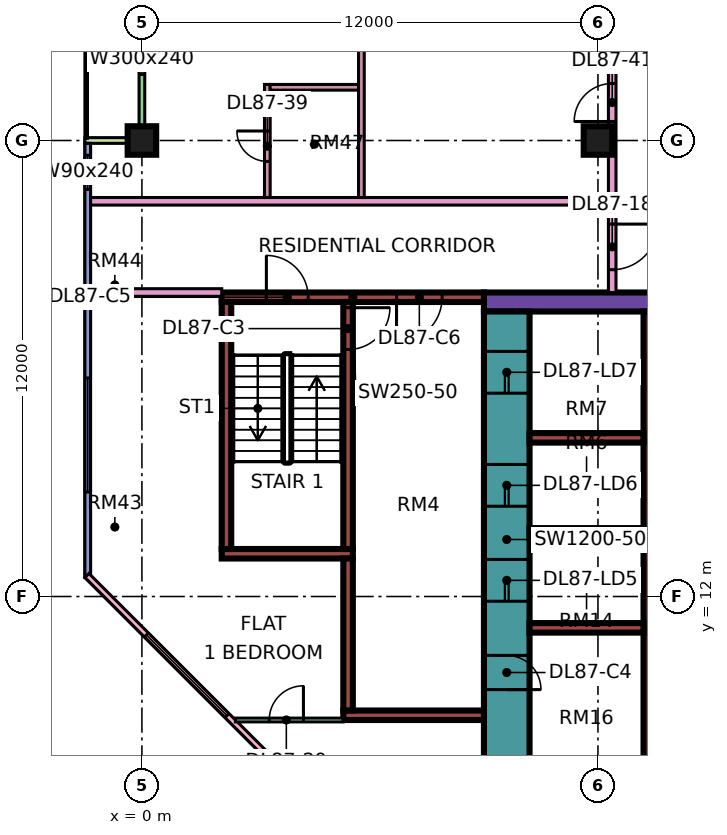
"""IFC4 building model, lengths in metres.
Left out: names, types, materials, properties, quantities, classifications, styles, units other than length and angle.
Written with IfcOpenShell. Run it as: python <this file> out.ifc"""

import sys

from ifc_helpers import new_model, si_unit, direction, frame, frame_2d, origin, origin_2d, place, context, subcontext, project, spatial, rectangle, extrude, element, fill, save


model = new_model("IFC4")
c1 = context("Model", 3, precision=1e-05, world=origin(), true_north=direction((0.0, 1.0)))
c2 = subcontext(c1, "Body", "Model", "MODEL_VIEW")
j1 = project(units=[si_unit("LENGTHUNIT", "METRE"), si_unit("PLANEANGLEUNIT", "RADIAN")], contexts=[c1])
p1 = place(None, origin())
s1 = spatial("IfcSite", under=j1, at=p1, CompositionType="ELEMENT")
p2 = place(p1, origin())
s2 = spatial("IfcBuilding", under=s1, at=p2, CompositionType="ELEMENT")
p3 = place(p2, frame((0.0, 0.0, 372.65)))
s3 = spatial("IfcBuildingStorey", under=s2, at=p3, CompositionType="ELEMENT", Elevation=372.65)
for number, where, z_axis, x_axis in (
    (1, (0.0, 24.0, 0.0), (0.0, 0.0, 1.0), (1.0, 0.0, 0.0)),
    (2, (12.0, 24.0, 0.0), (0.0, 0.0, 1.0), (1.0, 0.0, 0.0)),
):
    element("IfcColumn", number, at=place(p3, frame(where, z_axis=z_axis, x_axis=x_axis)), inside=s3, PredefinedType="COLUMN", context=c2, shape_type="SweptSolid", body=[
        extrude(rectangle(XDim=0.75, YDim=0.75, at=origin_2d()), origin(), (0.0, 0.0, 1.0), 3.75),
    ])
p4 = place(p3, frame((9.0, 19.75, 0.0), z_axis=(0.0, 0.0, 1.0), x_axis=(1.0, 0.0, 0.0)))
e3 = element("IfcWall", 3, at=p4, inside=s3, PredefinedType="SHEAR", context=c2, shape_type="SweptSolid", body=[
    extrude(rectangle(XDim=25.0, YDim=0.5, at=frame_2d((12.5, 0.0))), origin(), (0.0, 0.0, 1.0), 3.75),
])
p5 = place(p4, frame((19.1, 0.0, 0.0)))
e4 = element("IfcOpeningElement", 4, at=p5, cuts=e3, PredefinedType="OPENING", context=c2, shape_type="SweptSolid", body=[
    extrude(rectangle(XDim=1.8, YDim=2.4, at=frame_2d((0.9, 1.2))), frame((0.0, 0.26, 0.0), z_axis=(0.0, -1.0, 0.0), x_axis=(1.0, 0.0, 0.0)), (0.0, 0.0, 1.0), 0.52),
])
p6 = place(p3, frame((9.6, 7.5, 0.0), z_axis=(0.0, 0.0, 1.0), x_axis=(0.0, 1.0, 0.0)))
e5 = element("IfcWall", 5, at=p6, inside=s3, PredefinedType="SHEAR", context=c2, shape_type="SweptSolid", body=[
    extrude(rectangle(XDim=12.0, YDim=1.2, at=frame_2d((6.0, 0.0))), origin(), (0.0, 0.0, 1.0), 3.75),
])
p7 = place(p6, frame((4.375, 0.0, 0.0)))
e6 = element("IfcOpeningElement", 6, at=p7, cuts=e5, PredefinedType="OPENING", context=c2, shape_type="SweptSolid", body=[
    extrude(rectangle(XDim=1.1, YDim=2.2, at=frame_2d((0.55, 1.1))), frame((0.0, 0.61, 0.0), z_axis=(0.0, -1.0, 0.0), x_axis=(1.0, 0.0, 0.0)), (0.0, 0.0, 1.0), 1.22),
])
p8 = place(p6, frame((6.875, 0.0, 0.0)))
e7 = element("IfcOpeningElement", 7, at=p8, cuts=e5, PredefinedType="OPENING", context=c2, shape_type="SweptSolid", body=[
    extrude(rectangle(XDim=1.1, YDim=2.2, at=frame_2d((0.55, 1.1))), frame((0.0, 0.61, 0.0), z_axis=(0.0, -1.0, 0.0), x_axis=(1.0, 0.0, 0.0)), (0.0, 0.0, 1.0), 1.22),
])
p9 = place(p6, frame((9.85, 0.0, 0.0)))
e8 = element("IfcOpeningElement", 8, at=p9, cuts=e5, PredefinedType="OPENING", context=c2, shape_type="SweptSolid", body=[
    extrude(rectangle(XDim=1.1, YDim=2.2, at=frame_2d((0.55, 1.1))), frame((0.0, 0.61, 0.0), z_axis=(0.0, -1.0, 0.0), x_axis=(1.0, 0.0, 0.0)), (0.0, 0.0, 1.0), 1.22),
])
p10 = place(p6, frame((2.05, 0.0, 0.0)))
e9 = element("IfcOpeningElement", 9, at=p10, cuts=e5, PredefinedType="OPENING", context=c2, shape_type="SweptSolid", body=[
    extrude(rectangle(XDim=0.9, YDim=2.1, at=frame_2d((0.45, 1.05))), frame((0.0, 0.61, 0.0), z_axis=(0.0, -1.0, 0.0), x_axis=(1.0, 0.0, 0.0)), (0.0, 0.0, 1.0), 1.22),
])
p11 = place(p3, frame((13.325, 7.5, 0.0), z_axis=(0.0, 0.0, 1.0), x_axis=(0.0, 1.0, 0.0)))
e10 = element("IfcWall", 10, at=p11, inside=s3, PredefinedType="SHEAR", context=c2, shape_type="SweptSolid", body=[
    extrude(rectangle(XDim=12.0, YDim=0.25, at=frame_2d((6.0, 0.0))), origin(), (0.0, 0.0, 1.0), 3.75),
])
for number, where, z_axis, x_axis in (
    (11, (10.2, 11.175, 0.0), (0.0, 0.0, 1.0), (1.0, 0.0, 0.0)),
    (12, (10.2, 13.675, 0.0), (0.0, 0.0, 1.0), (1.0, 0.0, 0.0)),
    (13, (10.2, 16.175, 0.0), (0.0, 0.0, 1.0), (1.0, 0.0, 0.0)),
):
    element("IfcWall", number, at=place(p3, frame(where, z_axis=z_axis, x_axis=x_axis)), inside=s3, PredefinedType="SHEAR", context=c2, shape_type="SweptSolid", body=[
        extrude(rectangle(XDim=3.0, YDim=0.25, at=frame_2d((1.5, 0.0))), origin(), (0.0, 0.0, 1.0), 3.75),
    ])
p12 = place(p3, frame((2.1, 19.875, 0.0), z_axis=(0.0, 0.0, 1.0), x_axis=(1.0, 0.0, 0.0)))
e14 = element("IfcWall", 14, at=p12, inside=s3, PredefinedType="SHEAR", context=c2, shape_type="SweptSolid", body=[
    extrude(rectangle(XDim=6.9, YDim=0.25, at=frame_2d((3.45, 0.0))), origin(), (0.0, 0.0, 1.0), 3.75),
])
p13 = place(p12, frame((1.175, 0.0, 0.0)))
e15 = element("IfcOpeningElement", 15, at=p13, cuts=e14, PredefinedType="OPENING", context=c2, shape_type="SweptSolid", body=[
    extrude(rectangle(XDim=1.1, YDim=2.2, at=frame_2d((0.55, 1.1))), frame((0.0, 0.135, 0.0), z_axis=(0.0, -1.0, 0.0), x_axis=(1.0, 0.0, 0.0)), (0.0, 0.0, 1.0), 0.27),
])
p14 = place(p12, frame((4.6, 0.0, 0.0)))
e16 = element("IfcOpeningElement", 16, at=p14, cuts=e14, PredefinedType="OPENING", context=c2, shape_type="SweptSolid", body=[
    extrude(rectangle(XDim=1.2, YDim=2.2, at=frame_2d((0.6, 1.1))), frame((0.0, 0.135, 0.0), z_axis=(0.0, -1.0, 0.0), x_axis=(1.0, 0.0, 0.0)), (0.0, 0.0, 1.0), 0.27),
])
p15 = place(p3, frame((2.1, 13.125, 0.0), z_axis=(0.0, 0.0, 1.0), x_axis=(1.0, 0.0, 0.0)))
e17 = element("IfcWall", 17, at=p15, inside=s3, PredefinedType="SHEAR", context=c2, shape_type="SweptSolid", body=[
    extrude(rectangle(XDim=3.45, YDim=0.25, at=frame_2d((1.725, 0.0))), origin(), (0.0, 0.0, 1.0), 3.75),
])
p16 = place(p3, frame((2.225, 13.25, 0.0), z_axis=(0.0, 0.0, 1.0), x_axis=(0.0, 1.0, 0.0)))
e18 = element("IfcWall", 18, at=p16, inside=s3, PredefinedType="SHEAR", context=c2, shape_type="SweptSolid", body=[
    extrude(rectangle(XDim=6.5, YDim=0.25, at=frame_2d((3.25, 0.0))), origin(), (0.0, 0.0, 1.0), 3.75),
])
p17 = place(p3, frame((5.425, 13.25, 0.0), z_axis=(0.0, 0.0, 1.0), x_axis=(0.0, 1.0, 0.0)))
e19 = element("IfcWall", 19, at=p17, inside=s3, PredefinedType="SHEAR", context=c2, shape_type="SweptSolid", body=[
    extrude(rectangle(XDim=6.5, YDim=0.25, at=frame_2d((3.25, 0.0))), origin(), (0.0, 0.0, 1.0), 3.75),
])
p18 = place(p17, frame((5.25, 0.0, 0.0)))
e20 = element("IfcOpeningElement", 20, at=p18, cuts=e19, PredefinedType="OPENING", context=c2, shape_type="SweptSolid", body=[
    extrude(rectangle(XDim=1.1, YDim=2.2, at=frame_2d((0.55, 1.1))), frame((0.0, 0.135, 0.0), z_axis=(0.0, -1.0, 0.0), x_axis=(1.0, 0.0, 0.0)), (0.0, 0.0, 1.0), 0.27),
])
p19 = place(p3, frame((5.3, 8.875, 0.0), z_axis=(0.0, 0.0, 1.0), x_axis=(1.0, 0.0, 0.0)))
e21 = element("IfcWall", 21, at=p19, inside=s3, PredefinedType="SHEAR", context=c2, shape_type="SweptSolid", body=[
    extrude(rectangle(XDim=3.7, YDim=0.25, at=frame_2d((1.85, 0.0))), origin(), (0.0, 0.0, 1.0), 3.75),
])
p20 = place(p3, frame((5.425, 9.0, 0.0), z_axis=(0.0, 0.0, 1.0), x_axis=(0.0, 1.0, 0.0)))
e22 = element("IfcWall", 22, at=p20, inside=s3, PredefinedType="SHEAR", context=c2, shape_type="SweptSolid", body=[
    extrude(rectangle(XDim=4.0, YDim=0.25, at=frame_2d((2.0, 0.0))), origin(), (0.0, 0.0, 1.0), 3.75),
])
p21 = place(p3, frame((0.0, 35.925, 0.0), z_axis=(0.0, 0.0, 1.0), x_axis=(0.0, -1.0, 0.0)))
e23 = element("IfcWall", 23, at=p21, inside=s3, PredefinedType="SOLIDWALL", context=c2, shape_type="SweptSolid", body=[
    extrude(rectangle(XDim=11.85, YDim=0.15, at=frame_2d((5.925, 0.0))), origin(), (0.0, 0.0, 1.0), 3.35),
])
p22 = place(p21, frame((2.262, 0.0, 0.0)))
e24 = element("IfcOpeningElement", 24, at=p22, cuts=e23, PredefinedType="OPENING", context=c2, shape_type="SweptSolid", body=[
    extrude(rectangle(XDim=1.8, YDim=2.4, at=frame_2d((0.9, 1.2))), frame((0.0, 0.085, 0.0), z_axis=(0.0, -1.0, 0.0), x_axis=(1.0, 0.0, 0.0)), (0.0, 0.0, 1.0), 0.17),
])
p23 = place(p21, frame((7.188, 0.0, 0.45)))
e25 = element("IfcOpeningElement", 25, at=p23, cuts=e23, PredefinedType="OPENING", context=c2, shape_type="SweptSolid", body=[
    extrude(rectangle(XDim=3.0, YDim=2.4, at=frame_2d((1.5, 1.2))), frame((0.0, 0.085, 0.0), z_axis=(0.0, -1.0, 0.0), x_axis=(1.0, 0.0, 0.0)), (0.0, 0.0, 1.0), 0.17),
])
p24 = place(p3, frame((-1.5, 24.0, 0.0), z_axis=(0.0, 0.0, 1.0), x_axis=(1.0, 0.0, 0.0)))
e26 = element("IfcWall", 26, at=p24, inside=s3, PredefinedType="SOLIDWALL", context=c2, shape_type="SweptSolid", body=[
    extrude(rectangle(XDim=1.5, YDim=0.15, at=frame_2d((0.75, 0.0))), origin(), (0.0, 0.0, 1.0), 3.35),
])
p25 = place(p3, frame((-1.425, 23.925, 0.0), z_axis=(0.0, 0.0, 1.0), x_axis=(0.0, -1.0, 0.0)))
e27 = element("IfcWall", 27, at=p25, inside=s3, PredefinedType="SOLIDWALL", context=c2, shape_type="SweptSolid", body=[
    extrude(rectangle(XDim=11.425, YDim=0.15, at=frame_2d((5.712, 0.0))), origin(), (0.0, 0.0, 1.0), 3.35),
])
p26 = place(p25, frame((0.312, 0.0, 0.45)))
e28 = element("IfcOpeningElement", 28, at=p26, cuts=e27, PredefinedType="OPENING", context=c2, shape_type="SweptSolid", body=[
    extrude(rectangle(XDim=0.9, YDim=2.4, at=frame_2d((0.45, 1.2))), frame((0.0, 0.085, 0.0), z_axis=(0.0, -1.0, 0.0), x_axis=(1.0, 0.0, 0.0)), (0.0, 0.0, 1.0), 0.17),
])
p27 = place(p25, frame((6.175, 0.0, 0.45)))
e29 = element("IfcOpeningElement", 29, at=p27, cuts=e27, PredefinedType="OPENING", context=c2, shape_type="SweptSolid", body=[
    extrude(rectangle(XDim=3.0, YDim=2.4, at=frame_2d((1.5, 1.2))), frame((0.0, 0.085, 0.0), z_axis=(0.0, -1.0, 0.0), x_axis=(1.0, 0.0, 0.0)), (0.0, 0.0, 1.0), 0.17),
])
p28 = place(p3, frame((-1.447, 12.553, 0.0), z_axis=(0.0, 0.0, 1.0), x_axis=(0.707106781187, -0.707106781187, 0.0)))
e30 = element("IfcWall", 30, at=p28, inside=s3, PredefinedType="SOLIDWALL", context=c2, shape_type="SweptSolid", body=[
    extrude(rectangle(XDim=19.799, YDim=0.15, at=frame_2d((9.899, 0.0))), origin(), (0.0, 0.0, 1.0), 3.35),
])
p29 = place(p28, frame((2.212, 0.0, 0.45)))
e31 = element("IfcOpeningElement", 31, at=p29, cuts=e30, PredefinedType="OPENING", context=c2, shape_type="SweptSolid", body=[
    extrude(rectangle(XDim=3.0, YDim=2.4, at=frame_2d((1.5, 1.2))), frame((0.0, 0.085, 0.0), z_axis=(0.0, -1.0, 0.0), x_axis=(1.0, 0.0, 0.0)), (0.0, 0.0, 1.0), 0.17),
])
p30 = place(p28, frame((10.216, 0.0, 0.45)))
e32 = element("IfcOpeningElement", 32, at=p30, cuts=e30, PredefinedType="OPENING", context=c2, shape_type="SweptSolid", body=[
    extrude(rectangle(XDim=3.0, YDim=2.4, at=frame_2d((1.5, 1.2))), frame((0.0, 0.085, 0.0), z_axis=(0.0, -1.0, 0.0), x_axis=(1.0, 0.0, 0.0)), (0.0, 0.0, 1.0), 0.17),
])
p31 = place(p3, frame((-1.35, 20.0, 0.0), z_axis=(0.0, 0.0, 1.0), x_axis=(1.0, 0.0, 0.0)))
e33 = element("IfcWall", 33, at=p31, inside=s3, PredefinedType="PARTITIONING", context=c2, shape_type="SweptSolid", body=[
    extrude(rectangle(XDim=3.45, YDim=0.2, at=frame_2d((1.725, 0.0))), origin(), (0.0, 0.0, 1.0), 3.35),
])
p32 = place(p3, frame((-1.35, 22.4, 0.0), z_axis=(0.0, 0.0, 1.0), x_axis=(1.0, 0.0, 0.0)))
e34 = element("IfcWall", 34, at=p32, inside=s3, PredefinedType="PARTITIONING", context=c2, shape_type="SweptSolid", body=[
    extrude(rectangle(XDim=13.625, YDim=0.2, at=frame_2d((6.812, 0.0))), origin(), (0.0, 0.0, 1.0), 3.35),
])
p33 = place(p3, frame((2.461, 8.75, 0.0), z_axis=(0.0, 0.0, 1.0), x_axis=(1.0, 0.0, 0.0)))
e35 = element("IfcWall", 35, at=p33, inside=s3, PredefinedType="PARTITIONING", context=c2, shape_type="SweptSolid", body=[
    extrude(rectangle(XDim=2.839, YDim=0.1, at=frame_2d((1.419, 0.0))), origin(), (0.0, 0.0, 1.0), 3.35),
])
p34 = place(p33, frame((0.889, 0.0, 0.0)))
e36 = element("IfcOpeningElement", 36, at=p34, cuts=e35, PredefinedType="OPENING", context=c2, shape_type="SweptSolid", body=[
    extrude(rectangle(XDim=0.9, YDim=2.1, at=frame_2d((0.45, 1.05))), frame((0.0, 0.06, 0.0), z_axis=(0.0, -1.0, 0.0), x_axis=(1.0, 0.0, 0.0)), (0.0, 0.0, 1.0), 0.12),
])
p35 = place(p3, frame((3.3, 22.5, 0.0), z_axis=(0.0, 0.0, 1.0), x_axis=(0.0, 1.0, 0.0)))
e37 = element("IfcWall", 37, at=p35, inside=s3, PredefinedType="PARTITIONING", context=c2, shape_type="SweptSolid", body=[
    extrude(rectangle(XDim=2.975, YDim=0.15, at=frame_2d((1.488, 0.0))), origin(), (0.0, 0.0, 1.0), 3.35),
])
p36 = place(p35, frame((0.95, 0.0, 0.0)))
e38 = element("IfcOpeningElement", 38, at=p36, cuts=e37, PredefinedType="OPENING", context=c2, shape_type="SweptSolid", body=[
    extrude(rectangle(XDim=0.8, YDim=2.1, at=frame_2d((0.4, 1.05))), frame((0.0, 0.085, 0.0), z_axis=(0.0, -1.0, 0.0), x_axis=(1.0, 0.0, 0.0)), (0.0, 0.0, 1.0), 0.17),
])
p37 = place(p3, frame((3.375, 25.4, 0.0), z_axis=(0.0, 0.0, 1.0), x_axis=(1.0, 0.0, 0.0)))
e39 = element("IfcWall", 39, at=p37, inside=s3, PredefinedType="PARTITIONING", context=c2, shape_type="SweptSolid", body=[
    extrude(rectangle(XDim=2.325, YDim=0.15, at=frame_2d((1.163, 0.0))), origin(), (0.0, 0.0, 1.0), 3.35),
])
p38 = place(p3, frame((5.775, 22.5, 0.0), z_axis=(0.0, 0.0, 1.0), x_axis=(0.0, 1.0, 0.0)))
e40 = element("IfcWall", 40, at=p38, inside=s3, PredefinedType="PARTITIONING", context=c2, shape_type="SweptSolid", body=[
    extrude(rectangle(XDim=7.55, YDim=0.15, at=frame_2d((3.775, 0.0))), origin(), (0.0, 0.0, 1.0), 3.35),
])
p39 = place(p3, frame((12.375, 20.0, 0.0), z_axis=(0.0, 0.0, 1.0), x_axis=(0.0, 1.0, 0.0)))
e41 = element("IfcWall", 41, at=p39, inside=s3, PredefinedType="PARTITIONING", context=c2, shape_type="SweptSolid", body=[
    extrude(rectangle(XDim=34.0, YDim=0.2, at=frame_2d((17.0, 0.0))), origin(), (0.0, 0.0, 1.0), 3.35),
])
p40 = place(p39, frame((16.8, 0.0, 0.0)))
e42 = element("IfcOpeningElement", 42, at=p40, cuts=e41, PredefinedType="OPENING", context=c2, shape_type="SweptSolid", body=[
    extrude(rectangle(XDim=1.0, YDim=2.1, at=frame_2d((0.5, 1.05))), frame((0.0, 0.11, 0.0), z_axis=(0.0, -1.0, 0.0), x_axis=(1.0, 0.0, 0.0)), (0.0, 0.0, 1.0), 0.22),
])
p41 = place(p39, frame((0.6, 0.0, 0.0)))
e43 = element("IfcOpeningElement", 43, at=p41, cuts=e41, PredefinedType="OPENING", context=c2, shape_type="SweptSolid", body=[
    extrude(rectangle(XDim=1.2, YDim=2.1, at=frame_2d((0.6, 1.05))), frame((0.0, 0.11, 0.0), z_axis=(0.0, -1.0, 0.0), x_axis=(1.0, 0.0, 0.0)), (0.0, 0.0, 1.0), 0.22),
])
p42 = place(p39, frame((4.5, 0.0, 0.0)))
e44 = element("IfcOpeningElement", 44, at=p42, cuts=e41, PredefinedType="OPENING", context=c2, shape_type="SweptSolid", body=[
    extrude(rectangle(XDim=1.0, YDim=2.1, at=frame_2d((0.5, 1.05))), frame((0.0, 0.11, 0.0), z_axis=(0.0, -1.0, 0.0), x_axis=(1.0, 0.0, 0.0)), (0.0, 0.0, 1.0), 0.22),
])
p43 = place(p23, origin())
e45 = element("IfcWindow", 45, at=p43, inside=s3, PartitioningType="SINGLE_PANEL", PredefinedType="WINDOW", context=c2, shape_type="SweptSolid", body=[
    extrude(rectangle(XDim=3.0, YDim=2.4, at=frame_2d((1.5, 1.2))), frame((0.0, 0.03, 0.0), z_axis=(0.0, -1.0, 0.0), x_axis=(1.0, 0.0, 0.0)), (0.0, 0.0, 1.0), 0.06),
])
fill(e25, e45)
p44 = place(p26, origin())
e46 = element("IfcWindow", 46, at=p44, inside=s3, PartitioningType="SINGLE_PANEL", PredefinedType="WINDOW", context=c2, shape_type="SweptSolid", body=[
    extrude(rectangle(XDim=0.9, YDim=2.4, at=frame_2d((0.45, 1.2))), frame((0.0, 0.03, 0.0), z_axis=(0.0, -1.0, 0.0), x_axis=(1.0, 0.0, 0.0)), (0.0, 0.0, 1.0), 0.06),
])
fill(e28, e46)
p45 = place(p27, origin())
e47 = element("IfcWindow", 47, at=p45, inside=s3, PartitioningType="SINGLE_PANEL", PredefinedType="WINDOW", context=c2, shape_type="SweptSolid", body=[
    extrude(rectangle(XDim=3.0, YDim=2.4, at=frame_2d((1.5, 1.2))), frame((0.0, 0.03, 0.0), z_axis=(0.0, -1.0, 0.0), x_axis=(1.0, 0.0, 0.0)), (0.0, 0.0, 1.0), 0.06),
])
fill(e29, e47)
p46 = place(p29, origin())
e48 = element("IfcWindow", 48, at=p46, inside=s3, PartitioningType="SINGLE_PANEL", PredefinedType="WINDOW", context=c2, shape_type="SweptSolid", body=[
    extrude(rectangle(XDim=3.0, YDim=2.4, at=frame_2d((1.5, 1.2))), frame((0.0, 0.03, 0.0), z_axis=(0.0, -1.0, 0.0), x_axis=(1.0, 0.0, 0.0)), (0.0, 0.0, 1.0), 0.06),
])
fill(e31, e48)
p47 = place(p7, origin())
e49 = element("IfcDoor", 49, at=p47, inside=s3, OperationType="DOUBLE_DOOR_SLIDING", PredefinedType="DOOR", context=c2, shape_type="SweptSolid", body=[
    extrude(rectangle(XDim=1.1, YDim=2.2, at=frame_2d((0.55, 1.1))), frame((0.0, 0.025, 0.0), z_axis=(0.0, -1.0, 0.0), x_axis=(1.0, 0.0, 0.0)), (0.0, 0.0, 1.0), 0.05),
])
fill(e6, e49)
p48 = place(p8, origin())
e50 = element("IfcDoor", 50, at=p48, inside=s3, OperationType="DOUBLE_DOOR_SLIDING", PredefinedType="DOOR", context=c2, shape_type="SweptSolid", body=[
    extrude(rectangle(XDim=1.1, YDim=2.2, at=frame_2d((0.55, 1.1))), frame((0.0, 0.025, 0.0), z_axis=(0.0, -1.0, 0.0), x_axis=(1.0, 0.0, 0.0)), (0.0, 0.0, 1.0), 0.05),
])
fill(e7, e50)
p49 = place(p9, origin())
e51 = element("IfcDoor", 51, at=p49, inside=s3, OperationType="DOUBLE_DOOR_SLIDING", PredefinedType="DOOR", context=c2, shape_type="SweptSolid", body=[
    extrude(rectangle(XDim=1.1, YDim=2.2, at=frame_2d((0.55, 1.1))), frame((0.0, 0.025, 0.0), z_axis=(0.0, -1.0, 0.0), x_axis=(1.0, 0.0, 0.0)), (0.0, 0.0, 1.0), 0.05),
])
fill(e8, e51)
p50 = place(p18, origin())
e52 = element("IfcDoor", 52, at=p50, inside=s3, OperationType="SINGLE_SWING_RIGHT", PredefinedType="DOOR", context=c2, shape_type="SweptSolid", body=[
    extrude(rectangle(XDim=1.1, YDim=2.2, at=frame_2d((0.55, 1.1))), frame((0.0, 0.025, 0.0), z_axis=(0.0, -1.0, 0.0), x_axis=(1.0, 0.0, 0.0)), (0.0, 0.0, 1.0), 0.05),
])
fill(e20, e52)
p51 = place(p10, frame((0.9, 0.0, 0.0), z_axis=(0.0, 0.0, 1.0), x_axis=(-1.0, 0.0, 0.0)))
e53 = element("IfcDoor", 53, at=p51, inside=s3, OperationType="SINGLE_SWING_LEFT", PredefinedType="DOOR", context=c2, shape_type="SweptSolid", body=[
    extrude(rectangle(XDim=0.9, YDim=2.1, at=frame_2d((0.45, 1.05))), frame((0.0, 0.025, 0.0), z_axis=(0.0, -1.0, 0.0), x_axis=(1.0, 0.0, 0.0)), (0.0, 0.0, 1.0), 0.05),
])
fill(e9, e53)
p52 = place(p13, origin())
e54 = element("IfcDoor", 54, at=p52, inside=s3, OperationType="SINGLE_SWING_LEFT", PredefinedType="DOOR", context=c2, shape_type="SweptSolid", body=[
    extrude(rectangle(XDim=1.1, YDim=2.2, at=frame_2d((0.55, 1.1))), frame((0.0, 0.025, 0.0), z_axis=(0.0, -1.0, 0.0), x_axis=(1.0, 0.0, 0.0)), (0.0, 0.0, 1.0), 0.05),
])
fill(e15, e54)
p53 = place(p14, frame((1.2, 0.0, 0.0), z_axis=(0.0, 0.0, 1.0), x_axis=(-1.0, 0.0, 0.0)))
e55 = element("IfcDoor", 55, at=p53, inside=s3, OperationType="SINGLE_SWING_LEFT", PredefinedType="DOOR", context=c2, shape_type="SweptSolid", body=[
    extrude(rectangle(XDim=1.2, YDim=2.2, at=frame_2d((0.6, 1.1))), frame((0.0, 0.025, 0.0), z_axis=(0.0, -1.0, 0.0), x_axis=(1.0, 0.0, 0.0)), (0.0, 0.0, 1.0), 0.05),
])
fill(e16, e55)
p54 = place(p41, origin())
e56 = element("IfcDoor", 56, at=p54, inside=s3, OperationType="SINGLE_SWING_RIGHT", PredefinedType="DOOR", context=c2, shape_type="SweptSolid", body=[
    extrude(rectangle(XDim=1.2, YDim=2.1, at=frame_2d((0.6, 1.05))), frame((0.0, 0.025, 0.0), z_axis=(0.0, -1.0, 0.0), x_axis=(1.0, 0.0, 0.0)), (0.0, 0.0, 1.0), 0.05),
])
fill(e43, e56)
p55 = place(p34, frame((0.9, 0.0, 0.0), z_axis=(0.0, 0.0, 1.0), x_axis=(-1.0, 0.0, 0.0)))
e57 = element("IfcDoor", 57, at=p55, inside=s3, OperationType="SINGLE_SWING_RIGHT", PredefinedType="DOOR", context=c2, shape_type="SweptSolid", body=[
    extrude(rectangle(XDim=0.9, YDim=2.1, at=frame_2d((0.45, 1.05))), frame((0.0, 0.025, 0.0), z_axis=(0.0, -1.0, 0.0), x_axis=(1.0, 0.0, 0.0)), (0.0, 0.0, 1.0), 0.05),
])
fill(e36, e57)
p56 = place(p36, frame((0.8, 0.0, 0.0), z_axis=(0.0, 0.0, 1.0), x_axis=(-1.0, 0.0, 0.0)))
e58 = element("IfcDoor", 58, at=p56, inside=s3, OperationType="SINGLE_SWING_RIGHT", PredefinedType="DOOR", context=c2, shape_type="SweptSolid", body=[
    extrude(rectangle(XDim=0.8, YDim=2.1, at=frame_2d((0.4, 1.05))), frame((0.0, 0.025, 0.0), z_axis=(0.0, -1.0, 0.0), x_axis=(1.0, 0.0, 0.0)), (0.0, 0.0, 1.0), 0.05),
])
fill(e38, e58)
p57 = place(p42, origin())
e59 = element("IfcDoor", 59, at=p57, inside=s3, OperationType="SINGLE_SWING_LEFT", PredefinedType="DOOR", context=c2, shape_type="SweptSolid", body=[
    extrude(rectangle(XDim=1.0, YDim=2.1, at=frame_2d((0.5, 1.05))), frame((0.0, 0.025, 0.0), z_axis=(0.0, -1.0, 0.0), x_axis=(1.0, 0.0, 0.0)), (0.0, 0.0, 1.0), 0.05),
])
fill(e44, e59)
save(model, sys.argv[1])
